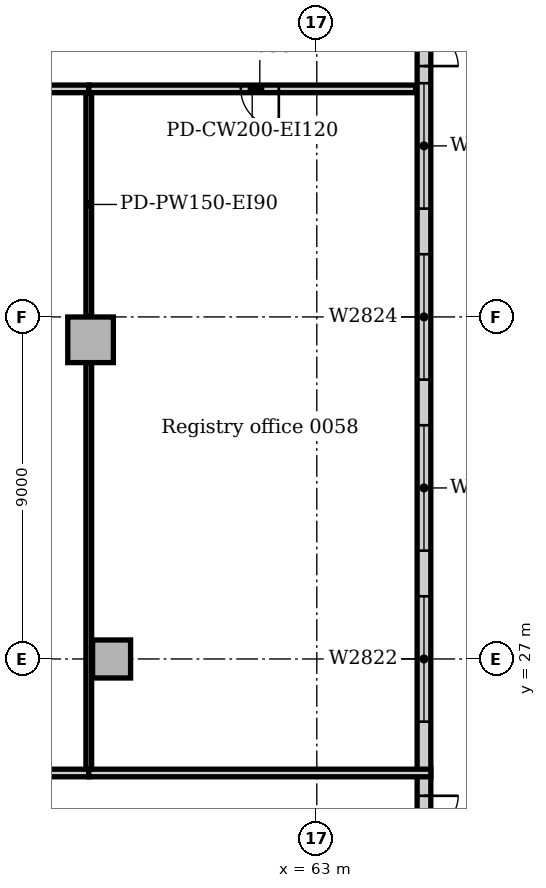
"""IFC4 building model, lengths in metres.
Left out: names, types, materials, properties, quantities, classifications, styles, units other than length and angle.
Written with IfcOpenShell. Run it as: python <this file> out.ifc"""

import sys

from ifc_helpers import new_model, si_unit, direction, frame, frame_2d, origin, origin_2d, place, context, subcontext, project, spatial, rectangle, extrude, element, fill, save


model = new_model("IFC4")
c1 = context("Model", 3, precision=1e-05, world=origin(), true_north=direction((0.0, 1.0)))
c2 = subcontext(c1, "Body", "Model", "MODEL_VIEW")
j1 = project(units=[si_unit("LENGTHUNIT", "METRE"), si_unit("PLANEANGLEUNIT", "RADIAN")], contexts=[c1])
p1 = place(None, origin())
s1 = spatial("IfcSite", under=j1, at=p1, CompositionType="ELEMENT")
p2 = place(p1, origin())
s2 = spatial("IfcBuilding", under=s1, at=p2, CompositionType="ELEMENT")
p3 = place(p2, origin())
s3 = spatial("IfcBuildingStorey", under=s2, at=p3, CompositionType="ELEMENT", Elevation=0.0)
p4 = place(p3, frame((57.047, 35.398, 0.0), z_axis=(0.0, 0.0, 1.0), x_axis=(1.0, 0.0, 0.0)))
e1 = element("IfcColumn", 1, at=p4, inside=s3, PredefinedType="COLUMN", context=c2, shape_type="SweptSolid", body=[
    extrude(rectangle(XDim=1.2, YDim=1.2, at=origin_2d()), origin(), (0.0, 0.0, 1.0), 5.7),
])
p5 = place(p3, frame((57.6, 27.0, 0.0), z_axis=(0.0, 0.0, 1.0), x_axis=(1.0, 0.0, 0.0)))
e2 = element("IfcColumn", 2, at=p5, inside=s3, PredefinedType="COLUMN", context=c2, shape_type="SweptSolid", body=[
    extrude(rectangle(XDim=1.0, YDim=1.0, at=origin_2d()), origin(), (0.0, 0.0, 1.0), 5.7),
])
p6 = place(p3, frame((65.82, -9.0, 0.0), z_axis=(0.0, 0.0, 1.0), x_axis=(0.0, 1.0, 0.0)))
e3 = element("IfcWall", 3, at=p6, inside=s3, PredefinedType="STANDARD", context=c2, shape_type="SweptSolid", body=[
    extrude(rectangle(XDim=63.0, YDim=0.36, at=frame_2d((31.5, 0.0))), origin(), (0.0, 0.0, 1.0), 5.7),
])
p7 = place(p6, frame((30.6, 0.0, 0.0)))
e4 = element("IfcOpeningElement", 4, at=p7, cuts=e3, PredefinedType="OPENING", context=c2, shape_type="SweptSolid", body=[
    extrude(rectangle(XDim=1.8, YDim=2.2, at=frame_2d((0.9, 1.1))), frame((0.0, 0.19, 0.0), z_axis=(0.0, -1.0, 0.0), x_axis=(1.0, 0.0, 0.0)), (0.0, 0.0, 1.0), 0.38),
])
p8 = place(p6, frame((51.6, 0.0, 0.0)))
e5 = element("IfcOpeningElement", 5, at=p8, cuts=e3, PredefinedType="OPENING", context=c2, shape_type="SweptSolid", body=[
    extrude(rectangle(XDim=1.8, YDim=2.2, at=frame_2d((0.9, 1.1))), frame((0.0, 0.19, 0.0), z_axis=(0.0, -1.0, 0.0), x_axis=(1.0, 0.0, 0.0)), (0.0, 0.0, 1.0), 0.38),
])
p9 = place(p6, frame((9.6, 0.0, 0.0)))
e6 = element("IfcOpeningElement", 6, at=p9, cuts=e3, PredefinedType="OPENING", context=c2, shape_type="SweptSolid", body=[
    extrude(rectangle(XDim=2.4, YDim=2.2, at=frame_2d((1.2, 1.1))), frame((0.0, 0.19, 0.0), z_axis=(0.0, -1.0, 0.0), x_axis=(1.0, 0.0, 0.0)), (0.0, 0.0, 1.0), 0.38),
])
p10 = place(p6, frame((2.85, 0.0, 0.6)))
e7 = element("IfcOpeningElement", 7, at=p10, cuts=e3, PredefinedType="OPENING", context=c2, shape_type="SweptSolid", body=[
    extrude(rectangle(XDim=3.3, YDim=3.0, at=frame_2d((1.65, 1.5))), frame((0.0, 0.19, 0.0), z_axis=(0.0, -1.0, 0.0), x_axis=(1.0, 0.0, 0.0)), (0.0, 0.0, 1.0), 0.38),
])
p11 = place(p6, frame((16.35, 0.0, 0.6)))
e8 = element("IfcOpeningElement", 8, at=p11, cuts=e3, PredefinedType="OPENING", context=c2, shape_type="SweptSolid", body=[
    extrude(rectangle(XDim=3.3, YDim=3.0, at=frame_2d((1.65, 1.5))), frame((0.0, 0.19, 0.0), z_axis=(0.0, -1.0, 0.0), x_axis=(1.0, 0.0, 0.0)), (0.0, 0.0, 1.0), 0.38),
])
p12 = place(p6, frame((20.85, 0.0, 0.6)))
e9 = element("IfcOpeningElement", 9, at=p12, cuts=e3, PredefinedType="OPENING", context=c2, shape_type="SweptSolid", body=[
    extrude(rectangle(XDim=3.3, YDim=3.0, at=frame_2d((1.65, 1.5))), frame((0.0, 0.19, 0.0), z_axis=(0.0, -1.0, 0.0), x_axis=(1.0, 0.0, 0.0)), (0.0, 0.0, 1.0), 0.38),
])
p13 = place(p6, frame((25.35, 0.0, 0.6)))
e10 = element("IfcOpeningElement", 10, at=p13, cuts=e3, PredefinedType="OPENING", context=c2, shape_type="SweptSolid", body=[
    extrude(rectangle(XDim=3.3, YDim=3.0, at=frame_2d((1.65, 1.5))), frame((0.0, 0.19, 0.0), z_axis=(0.0, -1.0, 0.0), x_axis=(1.0, 0.0, 0.0)), (0.0, 0.0, 1.0), 0.38),
])
p14 = place(p6, frame((34.35, 0.0, 0.6)))
e11 = element("IfcOpeningElement", 11, at=p14, cuts=e3, PredefinedType="OPENING", context=c2, shape_type="SweptSolid", body=[
    extrude(rectangle(XDim=3.3, YDim=3.0, at=frame_2d((1.65, 1.5))), frame((0.0, 0.19, 0.0), z_axis=(0.0, -1.0, 0.0), x_axis=(1.0, 0.0, 0.0)), (0.0, 0.0, 1.0), 0.38),
])
p15 = place(p6, frame((38.85, 0.0, 0.6)))
e12 = element("IfcOpeningElement", 12, at=p15, cuts=e3, PredefinedType="OPENING", context=c2, shape_type="SweptSolid", body=[
    extrude(rectangle(XDim=3.3, YDim=3.0, at=frame_2d((1.65, 1.5))), frame((0.0, 0.19, 0.0), z_axis=(0.0, -1.0, 0.0), x_axis=(1.0, 0.0, 0.0)), (0.0, 0.0, 1.0), 0.38),
])
p16 = place(p6, frame((43.35, 0.0, 0.6)))
e13 = element("IfcOpeningElement", 13, at=p16, cuts=e3, PredefinedType="OPENING", context=c2, shape_type="SweptSolid", body=[
    extrude(rectangle(XDim=3.3, YDim=3.0, at=frame_2d((1.65, 1.5))), frame((0.0, 0.19, 0.0), z_axis=(0.0, -1.0, 0.0), x_axis=(1.0, 0.0, 0.0)), (0.0, 0.0, 1.0), 0.38),
])
p17 = place(p6, frame((47.85, 0.0, 0.6)))
e14 = element("IfcOpeningElement", 14, at=p17, cuts=e3, PredefinedType="OPENING", context=c2, shape_type="SweptSolid", body=[
    extrude(rectangle(XDim=3.3, YDim=3.0, at=frame_2d((1.65, 1.5))), frame((0.0, 0.19, 0.0), z_axis=(0.0, -1.0, 0.0), x_axis=(1.0, 0.0, 0.0)), (0.0, 0.0, 1.0), 0.38),
])
p18 = place(p6, frame((56.85, 0.0, 0.6)))
e15 = element("IfcOpeningElement", 15, at=p18, cuts=e3, PredefinedType="OPENING", context=c2, shape_type="SweptSolid", body=[
    extrude(rectangle(XDim=3.3, YDim=3.0, at=frame_2d((1.65, 1.5))), frame((0.0, 0.19, 0.0), z_axis=(0.0, -1.0, 0.0), x_axis=(1.0, 0.0, 0.0)), (0.0, 0.0, 1.0), 0.38),
])
p19 = place(p3, frame((48.0, 42.0, 0.0), z_axis=(0.0, 0.0, 1.0), x_axis=(1.0, 0.0, 0.0)))
e16 = element("IfcWall", 16, at=p19, inside=s3, PredefinedType="PARTITIONING", context=c2, shape_type="SweptSolid", body=[
    extrude(rectangle(XDim=9.0, YDim=0.2, at=frame_2d((4.5, 0.0))), origin(), (0.0, 0.0, 1.0), 5.7),
])
p20 = place(p19, frame((4.0, 0.0, 0.0)))
e17 = element("IfcOpeningElement", 17, at=p20, cuts=e16, PredefinedType="OPENING", context=c2, shape_type="SweptSolid", body=[
    extrude(rectangle(XDim=1.0, YDim=2.1, at=frame_2d((0.5, 1.05))), frame((0.0, 0.11, 0.0), z_axis=(0.0, -1.0, 0.0), x_axis=(1.0, 0.0, 0.0)), (0.0, 0.0, 1.0), 0.22),
])
p21 = place(p3, frame((57.0, 42.0, 0.0), z_axis=(0.0, 0.0, 1.0), x_axis=(1.0, 0.0, 0.0)))
e18 = element("IfcWall", 18, at=p21, inside=s3, PredefinedType="PARTITIONING", context=c2, shape_type="SweptSolid", body=[
    extrude(rectangle(XDim=8.6, YDim=0.2, at=frame_2d((4.3, 0.0))), origin(), (0.0, 0.0, 1.0), 5.7),
])
p22 = place(p21, frame((4.0, 0.0, 0.0)))
e19 = element("IfcOpeningElement", 19, at=p22, cuts=e18, PredefinedType="OPENING", context=c2, shape_type="SweptSolid", body=[
    extrude(rectangle(XDim=1.0, YDim=2.1, at=frame_2d((0.5, 1.05))), frame((0.0, 0.11, 0.0), z_axis=(0.0, -1.0, 0.0), x_axis=(1.0, 0.0, 0.0)), (0.0, 0.0, 1.0), 0.22),
])
for number, where, z_axis, x_axis in (
    (20, (48.0, 24.0, 0.0), (0.0, 0.0, 1.0), (1.0, 0.0, 0.0)),
    (21, (57.0, 24.0, 0.0), (0.0, 0.0, 1.0), (1.0, 0.0, 0.0)),
):
    element("IfcWall", number, at=place(p3, frame(where, z_axis=z_axis, x_axis=x_axis)), inside=s3, PredefinedType="PARTITIONING", context=c2, shape_type="SweptSolid", body=[
        extrude(rectangle(XDim=9.0, YDim=0.2, at=frame_2d((4.5, 0.0))), origin(), (0.0, 0.0, 1.0), 5.7),
    ])
p23 = place(p3, frame((57.0, 24.1, 0.0), z_axis=(0.0, 0.0, 1.0), x_axis=(0.0, 1.0, 0.0)))
e22 = element("IfcWall", 22, at=p23, inside=s3, PredefinedType="PARTITIONING", context=c2, shape_type="SweptSolid", body=[
    extrude(rectangle(XDim=10.678, YDim=0.15, at=frame_2d((5.339, 0.0))), origin(), (0.0, 0.0, 1.0), 5.7),
])
p24 = place(p3, frame((57.0, 36.018, 0.0), z_axis=(0.0, 0.0, 1.0), x_axis=(0.0, 1.0, 0.0)))
e23 = element("IfcWall", 23, at=p24, inside=s3, PredefinedType="PARTITIONING", context=c2, shape_type="SweptSolid", body=[
    extrude(rectangle(XDim=5.882, YDim=0.15, at=frame_2d((2.941, 0.0))), origin(), (0.0, 0.0, 1.0), 5.7),
])
p25 = place(p7, frame((1.8, 0.0, 0.0), z_axis=(0.0, 0.0, 1.0), x_axis=(-1.0, 0.0, 0.0)))
e24 = element("IfcDoor", 24, at=p25, inside=s3, OperationType="DOUBLE_DOOR_SINGLE_SWING", PredefinedType="DOOR", context=c2, shape_type="SweptSolid", body=[
    extrude(rectangle(XDim=1.8, YDim=2.2, at=frame_2d((0.9, 1.1))), frame((0.0, -0.07, 0.0), z_axis=(0.0, -1.0, 0.0), x_axis=(1.0, 0.0, 0.0)), (0.0, 0.0, 1.0), 0.05),
])
fill(e4, e24)
p26 = place(p8, frame((1.8, 0.0, 0.0), z_axis=(0.0, 0.0, 1.0), x_axis=(-1.0, 0.0, 0.0)))
e25 = element("IfcDoor", 25, at=p26, inside=s3, OperationType="DOUBLE_DOOR_SINGLE_SWING", PredefinedType="DOOR", context=c2, shape_type="SweptSolid", body=[
    extrude(rectangle(XDim=1.8, YDim=2.2, at=frame_2d((0.9, 1.1))), frame((0.0, -0.07, 0.0), z_axis=(0.0, -1.0, 0.0), x_axis=(1.0, 0.0, 0.0)), (0.0, 0.0, 1.0), 0.05),
])
fill(e5, e25)
p27 = place(p14, origin())
e26 = element("IfcWindow", 26, at=p27, inside=s3, PartitioningType="SINGLE_PANEL", PredefinedType="WINDOW", context=c2, shape_type="SweptSolid", body=[
    extrude(rectangle(XDim=3.3, YDim=3.0, at=frame_2d((1.65, 1.5))), frame((0.0, 0.13, 0.0), z_axis=(0.0, -1.0, 0.0), x_axis=(1.0, 0.0, 0.0)), (0.0, 0.0, 1.0), 0.06),
])
fill(e11, e26)
p28 = place(p15, origin())
e27 = element("IfcWindow", 27, at=p28, inside=s3, PartitioningType="SINGLE_PANEL", PredefinedType="WINDOW", context=c2, shape_type="SweptSolid", body=[
    extrude(rectangle(XDim=3.3, YDim=3.0, at=frame_2d((1.65, 1.5))), frame((0.0, 0.13, 0.0), z_axis=(0.0, -1.0, 0.0), x_axis=(1.0, 0.0, 0.0)), (0.0, 0.0, 1.0), 0.06),
])
fill(e12, e27)
p29 = place(p16, origin())
e28 = element("IfcWindow", 28, at=p29, inside=s3, PartitioningType="SINGLE_PANEL", PredefinedType="WINDOW", context=c2, shape_type="SweptSolid", body=[
    extrude(rectangle(XDim=3.3, YDim=3.0, at=frame_2d((1.65, 1.5))), frame((0.0, 0.13, 0.0), z_axis=(0.0, -1.0, 0.0), x_axis=(1.0, 0.0, 0.0)), (0.0, 0.0, 1.0), 0.06),
])
fill(e13, e28)
p30 = place(p17, origin())
e29 = element("IfcWindow", 29, at=p30, inside=s3, PartitioningType="SINGLE_PANEL", PredefinedType="WINDOW", context=c2, shape_type="SweptSolid", body=[
    extrude(rectangle(XDim=3.3, YDim=3.0, at=frame_2d((1.65, 1.5))), frame((0.0, 0.13, 0.0), z_axis=(0.0, -1.0, 0.0), x_axis=(1.0, 0.0, 0.0)), (0.0, 0.0, 1.0), 0.06),
])
fill(e14, e29)
p31 = place(p22, frame((1.0, 0.0, 0.0), z_axis=(0.0, 0.0, 1.0), x_axis=(-1.0, 0.0, 0.0)))
e30 = element("IfcDoor", 30, at=p31, inside=s3, OperationType="SINGLE_SWING_LEFT", PredefinedType="DOOR", context=c2, shape_type="SweptSolid", body=[
    extrude(rectangle(XDim=1.0, YDim=2.1, at=frame_2d((0.5, 1.05))), frame((0.0, 0.025, 0.0), z_axis=(0.0, -1.0, 0.0), x_axis=(1.0, 0.0, 0.0)), (0.0, 0.0, 1.0), 0.05),
])
fill(e19, e30)
save(model, sys.argv[1])
